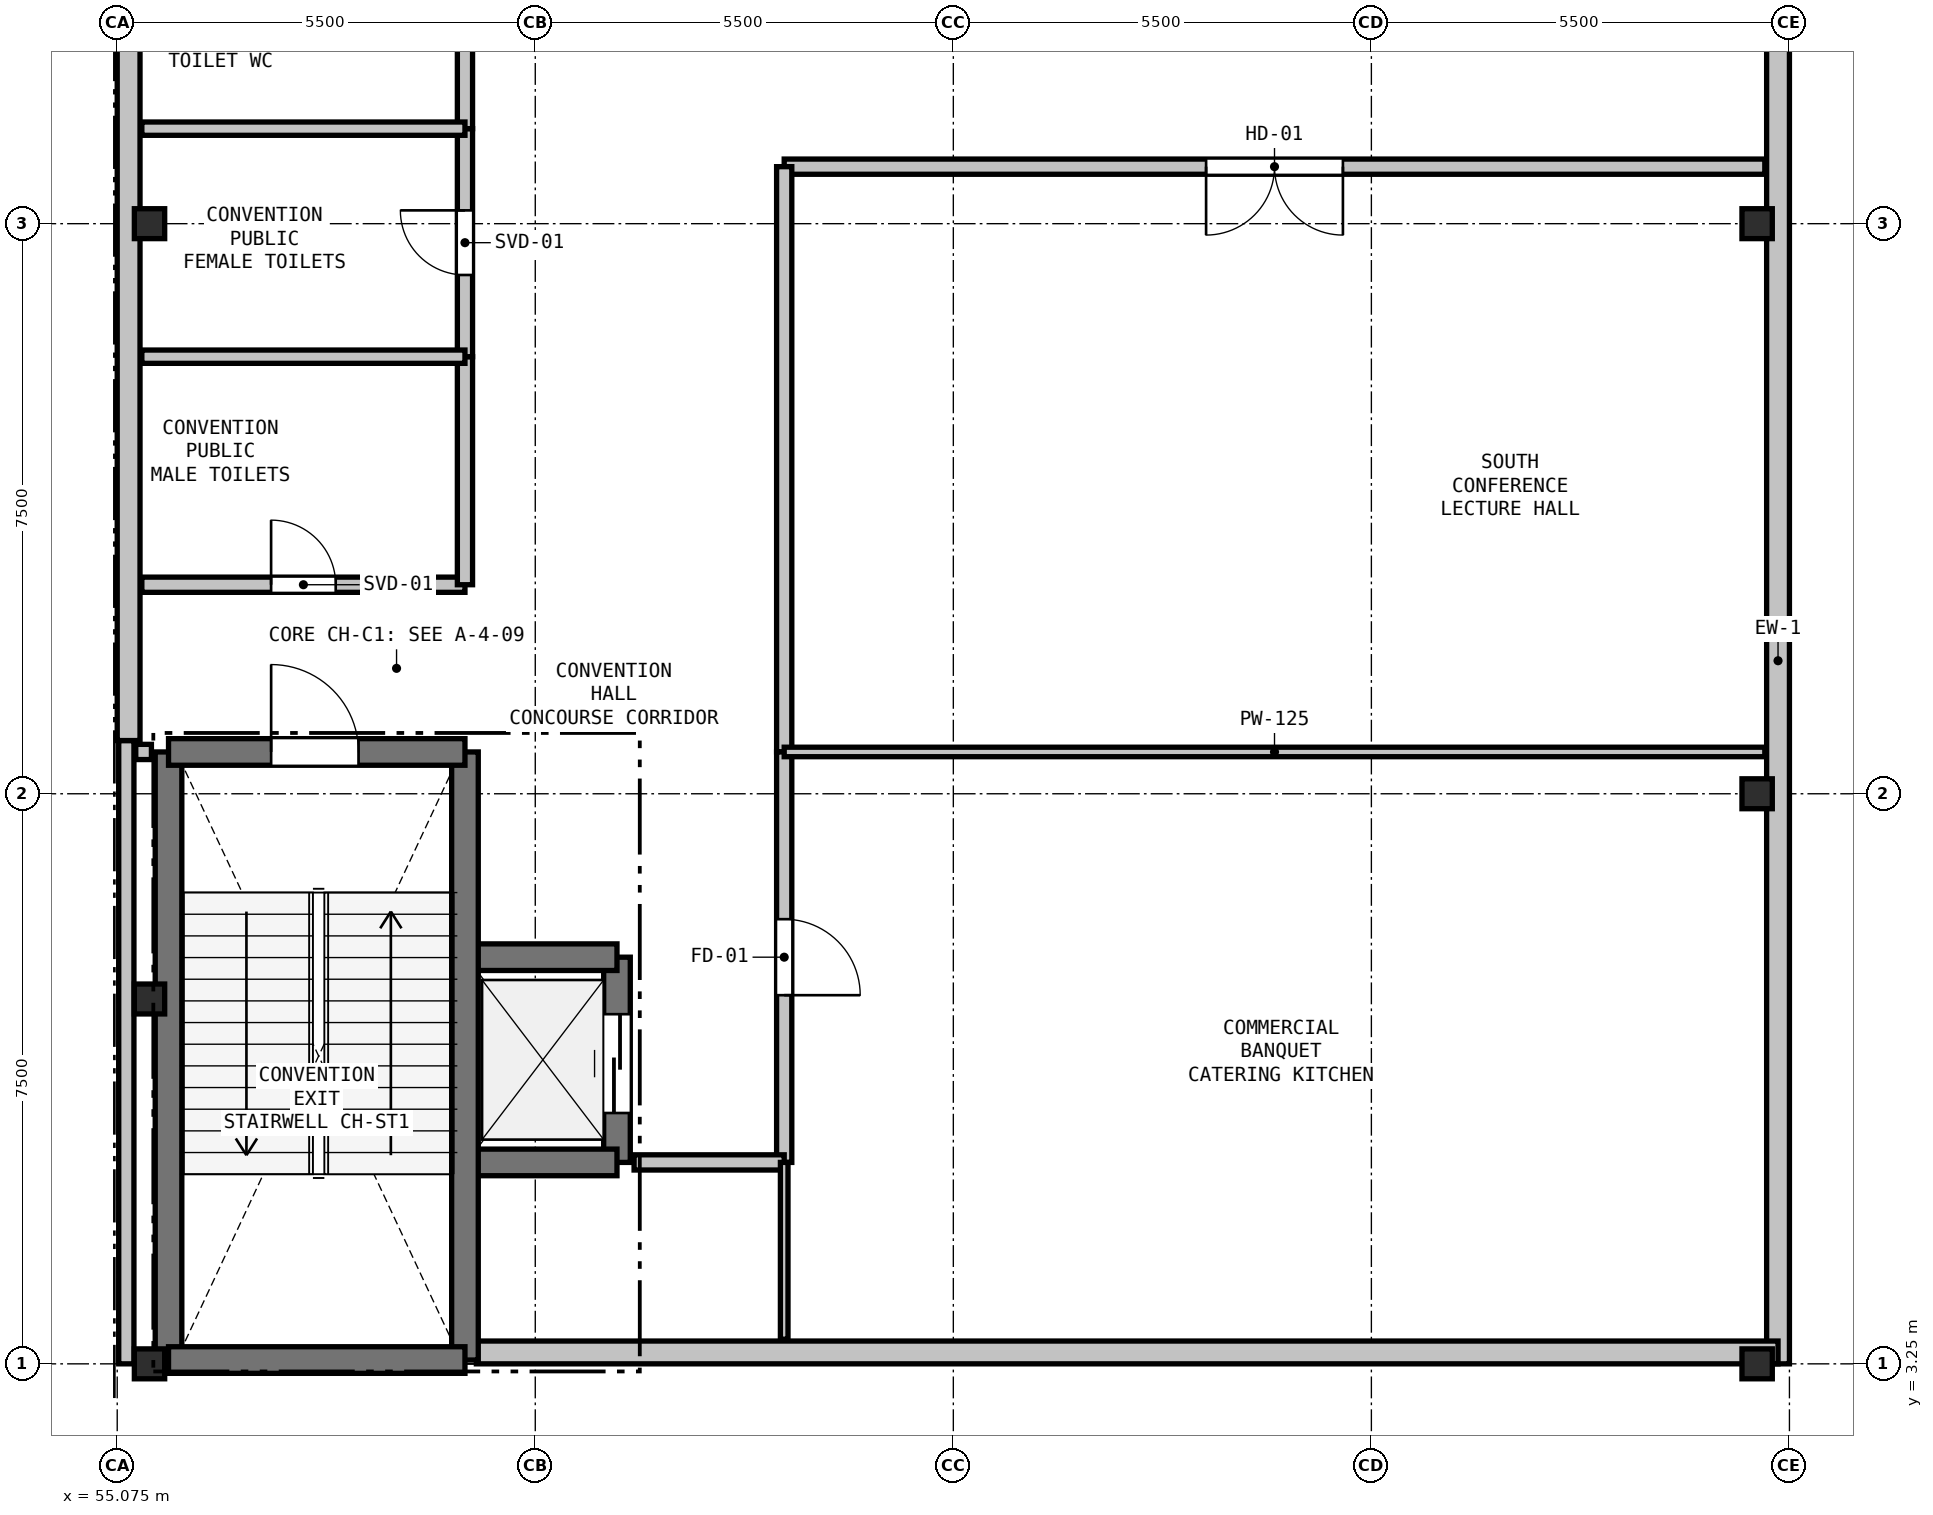
"""IFC4 building model, lengths in metres.
Left out: names, types, materials, properties, quantities, classifications, styles, units other than length and angle.
Written with IfcOpenShell. Run it as: python <this file> out.ifc"""

import sys

from ifc_helpers import new_model, si_unit, direction, frame, frame_2d, origin, origin_2d, place, context, subcontext, project, spatial, rectangle, i_section, extrude, element, fill, save


model = new_model("IFC4")
c1 = context("Model", 3, precision=1e-05, world=origin(), true_north=direction((0.0, 1.0)))
c2 = subcontext(c1, "Body", "Model", "MODEL_VIEW")
j1 = project(units=[si_unit("LENGTHUNIT", "METRE"), si_unit("PLANEANGLEUNIT", "RADIAN")], contexts=[c1])
p1 = place(None, origin())
s1 = spatial("IfcSite", under=j1, at=p1, CompositionType="ELEMENT")
p2 = place(p1, origin())
s2 = spatial("IfcBuilding", under=s1, at=p2, CompositionType="ELEMENT")
p3 = place(p2, frame((0.0, 0.0, 9.6)))
s3 = spatial("IfcBuildingStorey", under=s2, at=p3, CompositionType="ELEMENT", Elevation=9.6)
for number, where, z_axis, x_axis in (
    (1, (55.5, 3.25, 0.0), (0.0, 0.0, 1.0), (1.0, 0.0, 0.0)),
    (2, (55.5, 8.05, 0.0), (0.0, 0.0, 1.0), (1.0, 0.0, 0.0)),
    (3, (55.5, 18.25, 0.0), (0.0, 0.0, 1.0), (1.0, 0.0, 0.0)),
    (4, (76.65, 3.25, 0.0), (0.0, 0.0, 1.0), (1.0, 0.0, 0.0)),
    (5, (76.65, 10.75, 0.0), (0.0, 0.0, 1.0), (1.0, 0.0, 0.0)),
    (6, (76.65, 18.25, 0.0), (0.0, 0.0, 1.0), (1.0, 0.0, 0.0)),
):
    element("IfcColumn", number, at=place(p3, frame(where, z_axis=z_axis, x_axis=x_axis)), inside=s3, PredefinedType="COLUMN", context=c2, shape_type="SweptSolid", body=[
        extrude(i_section(OverallWidth=0.399, OverallDepth=0.394, WebThickness=0.023, FlangeThickness=0.037, at=origin_2d()), origin(), (0.0, 0.0, 1.0), 4.8),
    ])
p4 = place(p3, frame((55.195, 3.25, 0.0), z_axis=(0.0, 0.0, 1.0), x_axis=(0.0, 1.0, 0.0)))
e7 = element("IfcWall", 7, at=p4, inside=s3, PredefinedType="PARAPET", context=c2, shape_type="SweptSolid", body=[
    extrude(rectangle(XDim=8.2, YDim=0.2, at=frame_2d((4.1, 0.0))), origin(), (0.0, 0.0, 1.0), 4.09),
])
p5 = place(p3, frame((55.225, 11.45, 0.0), z_axis=(0.0, 0.0, 1.0), x_axis=(0.0, 1.0, 0.0)))
e8 = element("IfcWall", 8, at=p5, inside=s3, PredefinedType="SOLIDWALL", context=c2, shape_type="SweptSolid", body=[
    extrude(rectangle(XDim=10.95, YDim=0.3, at=frame_2d((5.475, 0.0))), origin(), (0.0, 0.0, 1.0), 4.09),
])
p6 = place(p3, frame((76.925, 21.75, 0.0), z_axis=(0.0, 0.0, 1.0), x_axis=(0.0, -1.0, 0.0)))
e9 = element("IfcWall", 9, at=p6, inside=s3, PredefinedType="SOLIDWALL", context=c2, shape_type="SweptSolid", body=[
    extrude(rectangle(XDim=18.5, YDim=0.3, at=frame_2d((9.25, 0.0))), origin(), (0.0, 0.0, 1.0), 4.09),
])
p7 = place(p3, frame((76.925, 3.4, 0.0), z_axis=(0.0, 0.0, 1.0), x_axis=(-1.0, 0.0, 0.0)))
e10 = element("IfcWall", 10, at=p7, inside=s3, PredefinedType="SOLIDWALL", context=c2, shape_type="SweptSolid", body=[
    extrude(rectangle(XDim=17.125, YDim=0.3, at=frame_2d((8.562, 0.0))), origin(), (0.0, 0.0, 1.0), 3.614),
])
p8 = place(p3, frame((61.65, 5.9, 0.0), z_axis=(0.0, 0.0, 1.0), x_axis=(0.0, 1.0, 0.0)))
e11 = element("IfcWall", 11, at=p8, inside=s3, PredefinedType="SHEAR", context=c2, shape_type="SweptSolid", body=[
    extrude(rectangle(XDim=2.7, YDim=0.35, at=frame_2d((1.35, 0.0))), origin(), (0.0, 0.0, 1.0), 4.48),
])
p9 = place(p8, frame((0.65, 0.0, 0.0)))
e12 = element("IfcOpeningElement", 12, at=p9, cuts=e11, PredefinedType="OPENING", context=c2, shape_type="SweptSolid", body=[
    extrude(rectangle(XDim=1.3, YDim=2.2, at=frame_2d((0.65, 1.1))), frame((0.0, 0.185, 0.0), z_axis=(0.0, -1.0, 0.0), x_axis=(1.0, 0.0, 0.0)), (0.0, 0.0, 1.0), 0.37),
])
for number, where, z_axis, x_axis in (
    (13, (59.65, 8.6, 0.0), (0.0, 0.0, 1.0), (1.0, 0.0, 0.0)),
    (14, (59.65, 5.9, 0.0), (0.0, 0.0, 1.0), (1.0, 0.0, 0.0)),
):
    element("IfcWall", number, at=place(p3, frame(where, z_axis=z_axis, x_axis=x_axis)), inside=s3, PredefinedType="SHEAR", context=c2, shape_type="SweptSolid", body=[
        extrude(rectangle(XDim=2.0, YDim=0.35, at=frame_2d((1.0, 0.0))), origin(), (0.0, 0.0, 1.0), 4.48),
    ])
for number, where, z_axis, x_axis in (
    (15, (59.65, 11.3, 0.0), (0.0, 0.0, 1.0), (0.0, -1.0, 0.0)),
    (16, (55.75, 3.3, 0.0), (0.0, 0.0, 1.0), (0.0, 1.0, 0.0)),
):
    element("IfcWall", number, at=place(p3, frame(where, z_axis=z_axis, x_axis=x_axis)), inside=s3, PredefinedType="SHEAR", context=c2, shape_type="SweptSolid", body=[
        extrude(rectangle(XDim=8.0, YDim=0.35, at=frame_2d((4.0, 0.0))), origin(), (0.0, 0.0, 1.0), 4.48),
    ])
p10 = place(p3, frame((55.75, 11.3, 0.0), z_axis=(0.0, 0.0, 1.0), x_axis=(1.0, 0.0, 0.0)))
e17 = element("IfcWall", 17, at=p10, inside=s3, PredefinedType="SHEAR", context=c2, shape_type="SweptSolid", body=[
    extrude(rectangle(XDim=3.9, YDim=0.35, at=frame_2d((1.95, 0.0))), origin(), (0.0, 0.0, 1.0), 4.48),
])
p11 = place(p10, frame((1.35, 0.0, 0.0)))
e18 = element("IfcOpeningElement", 18, at=p11, cuts=e17, PredefinedType="OPENING", context=c2, shape_type="SweptSolid", body=[
    extrude(rectangle(XDim=1.15, YDim=2.15, at=frame_2d((0.575, 1.075))), frame((0.0, 0.185, 0.0), z_axis=(0.0, -1.0, 0.0), x_axis=(1.0, 0.0, 0.0)), (0.0, 0.0, 1.0), 0.37),
])
p12 = place(p3, frame((55.75, 3.3, 0.0), z_axis=(0.0, 0.0, 1.0), x_axis=(1.0, 0.0, 0.0)))
e19 = element("IfcWall", 19, at=p12, inside=s3, PredefinedType="SHEAR", context=c2, shape_type="SweptSolid", body=[
    extrude(rectangle(XDim=3.9, YDim=0.35, at=frame_2d((1.95, 0.0))), origin(), (0.0, 0.0, 1.0), 4.48),
])
p13 = place(p3, frame((55.525, 11.3, 0.0), z_axis=(0.0, 0.0, 1.0), x_axis=(-1.0, 0.0, 0.0)))
e20 = element("IfcWall", 20, at=p13, inside=s3, PredefinedType="PARTITIONING", context=c2, shape_type="SweptSolid", body=[
    extrude(rectangle(XDim=0.206, YDim=0.2, at=frame_2d((0.103, 0.0))), origin(), (0.0, 0.0, 1.0), 4.09),
])
p14 = place(p3, frame((55.399, 13.5, 0.0), z_axis=(0.0, 0.0, 1.0), x_axis=(1.0, 0.0, 0.0)))
e21 = element("IfcWall", 21, at=p14, inside=s3, PredefinedType="PARTITIONING", context=c2, shape_type="SweptSolid", body=[
    extrude(rectangle(XDim=4.251, YDim=0.2, at=frame_2d((2.125, 0.0))), origin(), (0.0, 0.0, 1.0), 4.09),
])
p15 = place(p14, frame((1.7, 0.0, 0.0)))
e22 = element("IfcOpeningElement", 22, at=p15, cuts=e21, PredefinedType="OPENING", context=c2, shape_type="SweptSolid", body=[
    extrude(rectangle(XDim=0.85, YDim=2.1, at=frame_2d((0.425, 1.05))), frame((0.0, 0.11, 0.0), z_axis=(0.0, -1.0, 0.0), x_axis=(1.0, 0.0, 0.0)), (0.0, 0.0, 1.0), 0.22),
])
p16 = place(p3, frame((59.65, 13.5, 0.0), z_axis=(0.0, 0.0, 1.0), x_axis=(0.0, 1.0, 0.0)))
e23 = element("IfcWall", 23, at=p16, inside=s3, PredefinedType="PARTITIONING", context=c2, shape_type="SweptSolid", body=[
    extrude(rectangle(XDim=3.0, YDim=0.2, at=frame_2d((1.5, 0.0))), origin(), (0.0, 0.0, 1.0), 4.48),
])
p17 = place(p3, frame((59.65, 16.5, 0.0), z_axis=(0.0, 0.0, 1.0), x_axis=(0.0, 1.0, 0.0)))
e24 = element("IfcWall", 24, at=p17, inside=s3, PredefinedType="PARTITIONING", context=c2, shape_type="SweptSolid", body=[
    extrude(rectangle(XDim=3.0, YDim=0.2, at=frame_2d((1.5, 0.0))), origin(), (0.0, 0.0, 1.0), 3.614),
])
p18 = place(p17, frame((1.075, 0.0, 0.0)))
e25 = element("IfcOpeningElement", 25, at=p18, cuts=e24, PredefinedType="OPENING", context=c2, shape_type="SweptSolid", body=[
    extrude(rectangle(XDim=0.85, YDim=2.1, at=frame_2d((0.425, 1.05))), frame((0.0, 0.11, 0.0), z_axis=(0.0, -1.0, 0.0), x_axis=(1.0, 0.0, 0.0)), (0.0, 0.0, 1.0), 0.22),
])
p19 = place(p3, frame((59.65, 19.5, 0.0), z_axis=(0.0, 0.0, 1.0), x_axis=(0.0, 1.0, 0.0)))
e26 = element("IfcWall", 26, at=p19, inside=s3, PredefinedType="PARTITIONING", context=c2, shape_type="SweptSolid", body=[
    extrude(rectangle(XDim=3.0, YDim=0.2, at=frame_2d((1.5, 0.0))), origin(), (0.0, 0.0, 1.0), 4.48),
])
p20 = place(p19, frame((1.075, 0.0, 0.0)))
e27 = element("IfcOpeningElement", 27, at=p20, cuts=e26, PredefinedType="OPENING", context=c2, shape_type="SweptSolid", body=[
    extrude(rectangle(XDim=0.85, YDim=2.1, at=frame_2d((0.425, 1.05))), frame((0.0, 0.11, 0.0), z_axis=(0.0, -1.0, 0.0), x_axis=(1.0, 0.0, 0.0)), (0.0, 0.0, 1.0), 0.22),
])
p21 = place(p3, frame((76.751, 19.0, 0.0), z_axis=(0.0, 0.0, 1.0), x_axis=(-1.0, 0.0, 0.0)))
e28 = element("IfcWall", 28, at=p21, inside=s3, PredefinedType="PARTITIONING", context=c2, shape_type="SweptSolid", body=[
    extrude(rectangle(XDim=12.901, YDim=0.2, at=frame_2d((6.45, 0.0))), origin(), (0.0, 0.0, 1.0), 4.055),
])
p22 = place(p21, frame((5.551, 0.0, 0.0)))
e29 = element("IfcOpeningElement", 29, at=p22, cuts=e28, PredefinedType="OPENING", context=c2, shape_type="SweptSolid", body=[
    extrude(rectangle(XDim=1.8, YDim=2.2, at=frame_2d((0.9, 1.1))), frame((0.0, 0.11, 0.0), z_axis=(0.0, -1.0, 0.0), x_axis=(1.0, 0.0, 0.0)), (0.0, 0.0, 1.0), 0.22),
])
p23 = place(p3, frame((63.85, 19.0, 0.0), z_axis=(0.0, 0.0, 1.0), x_axis=(0.0, -1.0, 0.0)))
e30 = element("IfcWall", 30, at=p23, inside=s3, PredefinedType="PARTITIONING", context=c2, shape_type="SweptSolid", body=[
    extrude(rectangle(XDim=7.7, YDim=0.2, at=frame_2d((3.85, 0.0))), origin(), (0.0, 0.0, 1.0), 3.614),
])
p24 = place(p3, frame((63.85, 11.3, 0.0), z_axis=(0.0, 0.0, 1.0), x_axis=(0.0, -1.0, 0.0)))
e31 = element("IfcWall", 31, at=p24, inside=s3, PredefinedType="PARTITIONING", context=c2, shape_type="SweptSolid", body=[
    extrude(rectangle(XDim=5.4, YDim=0.2, at=frame_2d((2.7, 0.0))), origin(), (0.0, 0.0, 1.0), 3.614),
])
p25 = place(p24, frame((2.2, 0.0, 0.0)))
e32 = element("IfcOpeningElement", 32, at=p25, cuts=e31, PredefinedType="OPENING", context=c2, shape_type="SweptSolid", body=[
    extrude(rectangle(XDim=1.0, YDim=2.15, at=frame_2d((0.5, 1.075))), frame((0.0, 0.11, 0.0), z_axis=(0.0, -1.0, 0.0), x_axis=(1.0, 0.0, 0.0)), (0.0, 0.0, 1.0), 0.22),
])
p26 = place(p3, frame((63.85, 5.9, 0.0), z_axis=(0.0, 0.0, 1.0), x_axis=(-1.0, 0.0, 0.0)))
e33 = element("IfcWall", 33, at=p26, inside=s3, PredefinedType="PARTITIONING", context=c2, shape_type="SweptSolid", body=[
    extrude(rectangle(XDim=1.975, YDim=0.2, at=frame_2d((0.988, 0.0))), origin(), (0.0, 0.0, 1.0), 4.055),
])
for number, where, z_axis, x_axis in (
    (34, (55.399, 16.5, 0.0), (0.0, 0.0, 1.0), (1.0, 0.0, 0.0)),
    (35, (55.399, 19.5, 0.0), (0.0, 0.0, 1.0), (1.0, 0.0, 0.0)),
):
    element("IfcWall", number, at=place(p3, frame(where, z_axis=z_axis, x_axis=x_axis)), inside=s3, PredefinedType="PLUMBINGWALL", context=c2, shape_type="SweptSolid", body=[
        extrude(rectangle(XDim=4.251, YDim=0.175, at=frame_2d((2.125, 0.0))), origin(), (0.0, 0.0, 1.0), 4.09),
    ])
p27 = place(p3, frame((63.85, 3.574, 0.0), z_axis=(0.0, 0.0, 1.0), x_axis=(0.0, 1.0, 0.0)))
e36 = element("IfcWall", 36, at=p27, inside=s3, PredefinedType="PARTITIONING", context=c2, shape_type="SweptSolid", body=[
    extrude(rectangle(XDim=2.326, YDim=0.1, at=frame_2d((1.163, 0.0))), origin(), (0.0, 0.0, 1.0), 4.48),
])
p28 = place(p3, frame((63.85, 11.3, 0.0), z_axis=(0.0, 0.0, 1.0), x_axis=(1.0, 0.0, 0.0)))
e37 = element("IfcWall", 37, at=p28, inside=s3, PredefinedType="PARTITIONING", context=c2, shape_type="SweptSolid", body=[
    extrude(rectangle(XDim=12.901, YDim=0.125, at=frame_2d((6.45, 0.0))), origin(), (0.0, 0.0, 1.0), 4.055),
])
p29 = place(p9, origin())
e38 = element("IfcDoor", 38, at=p29, inside=s3, OperationType="SLIDING_TO_LEFT", PredefinedType="DOOR", context=c2, shape_type="SweptSolid", body=[
    extrude(rectangle(XDim=1.3, YDim=2.2, at=frame_2d((0.65, 1.1))), frame((0.0, 0.025, 0.0), z_axis=(0.0, -1.0, 0.0), x_axis=(1.0, 0.0, 0.0)), (0.0, 0.0, 1.0), 0.05),
])
fill(e12, e38)
p30 = place(p11, origin())
e39 = element("IfcDoor", 39, at=p30, inside=s3, OperationType="SINGLE_SWING_LEFT", PredefinedType="DOOR", context=c2, shape_type="SweptSolid", body=[
    extrude(rectangle(XDim=1.15, YDim=2.15, at=frame_2d((0.575, 1.075))), frame((0.0, 0.025, 0.0), z_axis=(0.0, -1.0, 0.0), x_axis=(1.0, 0.0, 0.0)), (0.0, 0.0, 1.0), 0.05),
])
fill(e18, e39)
p31 = place(p15, origin())
e40 = element("IfcDoor", 40, at=p31, inside=s3, OperationType="SINGLE_SWING_LEFT", PredefinedType="DOOR", context=c2, shape_type="SweptSolid", body=[
    extrude(rectangle(XDim=0.85, YDim=2.1, at=frame_2d((0.425, 1.05))), frame((0.0, 0.025, 0.0), z_axis=(0.0, -1.0, 0.0), x_axis=(1.0, 0.0, 0.0)), (0.0, 0.0, 1.0), 0.05),
])
fill(e22, e40)
p32 = place(p18, origin())
e41 = element("IfcDoor", 41, at=p32, inside=s3, OperationType="SINGLE_SWING_RIGHT", PredefinedType="DOOR", context=c2, shape_type="SweptSolid", body=[
    extrude(rectangle(XDim=0.85, YDim=2.1, at=frame_2d((0.425, 1.05))), frame((0.0, 0.025, 0.0), z_axis=(0.0, -1.0, 0.0), x_axis=(1.0, 0.0, 0.0)), (0.0, 0.0, 1.0), 0.05),
])
fill(e25, e41)
p33 = place(p25, origin())
e42 = element("IfcDoor", 42, at=p33, inside=s3, OperationType="SINGLE_SWING_RIGHT", PredefinedType="DOOR", context=c2, shape_type="SweptSolid", body=[
    extrude(rectangle(XDim=1.0, YDim=2.15, at=frame_2d((0.5, 1.075))), frame((0.0, 0.025, 0.0), z_axis=(0.0, -1.0, 0.0), x_axis=(1.0, 0.0, 0.0)), (0.0, 0.0, 1.0), 0.05),
])
fill(e32, e42)
p34 = place(p22, origin())
e43 = element("IfcDoor", 43, at=p34, inside=s3, OperationType="DOUBLE_DOOR_SINGLE_SWING", PredefinedType="DOOR", context=c2, shape_type="SweptSolid", body=[
    extrude(rectangle(XDim=1.8, YDim=2.2, at=frame_2d((0.9, 1.1))), frame((0.0, 0.025, 0.0), z_axis=(0.0, -1.0, 0.0), x_axis=(1.0, 0.0, 0.0)), (0.0, 0.0, 1.0), 0.05),
])
fill(e29, e43)
save(model, sys.argv[1])
